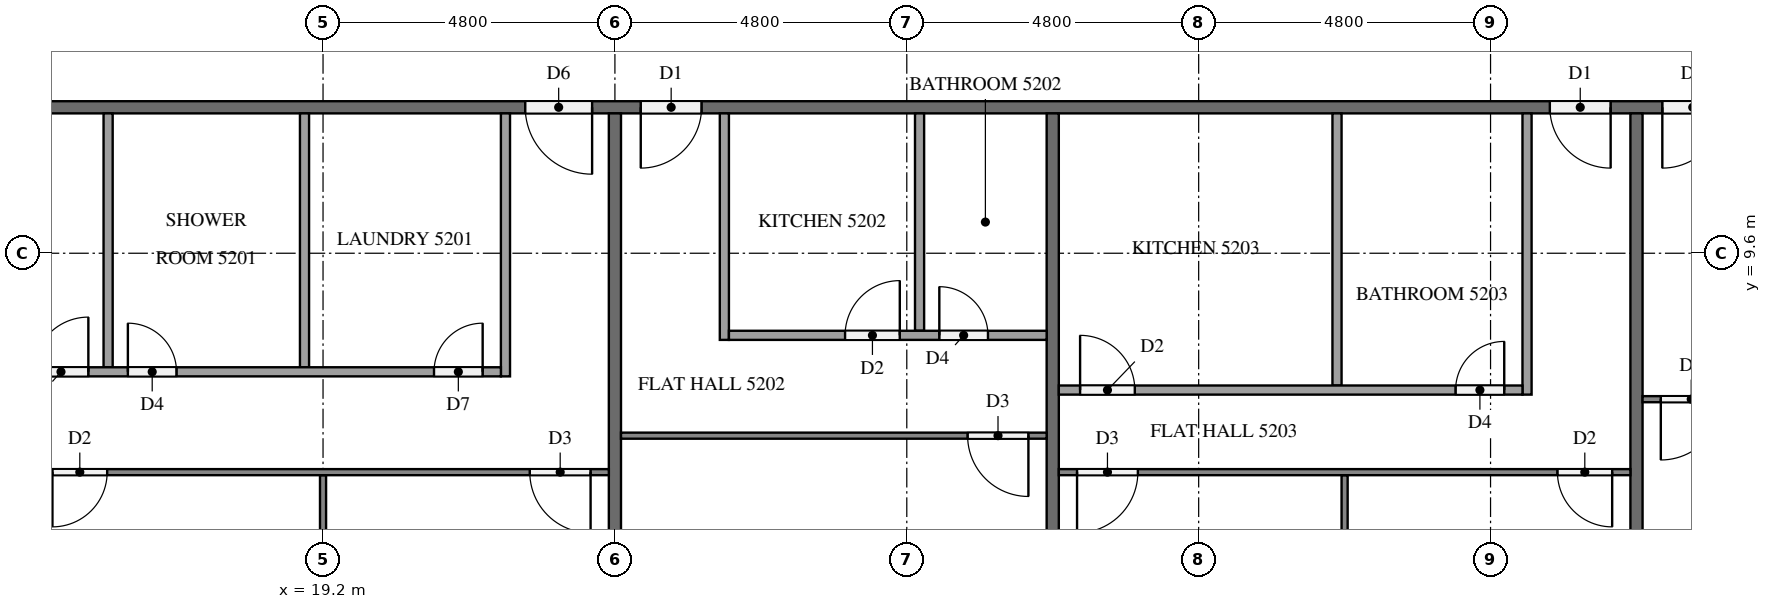
"""IFC4 building model, lengths in metres.
Left out: names, types, materials, properties, quantities, classifications, styles, units other than length and angle.
Written with IfcOpenShell. Run it as: python <this file> out.ifc"""

import sys

from ifc_helpers import new_model, si_unit, direction, frame, frame_2d, origin, place, context, subcontext, project, spatial, rectangle, extrude, element, fill, save


model = new_model("IFC4")
c1 = context("Model", 3, precision=1e-05, world=origin(), true_north=direction((0.0, 1.0)))
c2 = subcontext(c1, "Body", "Model", "MODEL_VIEW")
j1 = project(units=[si_unit("LENGTHUNIT", "METRE"), si_unit("PLANEANGLEUNIT", "RADIAN")], contexts=[c1])
p1 = place(None, origin())
s1 = spatial("IfcSite", under=j1, at=p1, CompositionType="ELEMENT")
p2 = place(p1, origin())
s2 = spatial("IfcBuilding", under=s1, at=p2, CompositionType="ELEMENT")
p3 = place(p2, frame((0.0, 0.0, 199.9)))
s3 = spatial("IfcBuildingStorey", under=s2, at=p3, CompositionType="ELEMENT", Elevation=199.9)
p4 = place(p3, frame((50.5, 12.0, 0.0), z_axis=(0.0, 0.0, 1.0), x_axis=(-1.0, 0.0, 0.0)))
e1 = element("IfcWall", 1, at=p4, inside=s3, PredefinedType="PARTITIONING", context=c2, shape_type="SweptSolid", body=[
    extrude(rectangle(XDim=38.6, YDim=0.2, at=frame_2d((19.3, 0.0))), origin(), (0.0, 0.0, 1.0), 3.1),
])
p5 = place(p4, frame((26.875, 0.0, 0.0)))
e2 = element("IfcOpeningElement", 2, at=p5, cuts=e1, PredefinedType="OPENING", context=c2, shape_type="SweptSolid", body=[
    extrude(rectangle(XDim=1.1, YDim=2.1, at=frame_2d((0.55, 1.05))), frame((0.0, 0.11, 0.0), z_axis=(0.0, -1.0, 0.0), x_axis=(1.0, 0.0, 0.0)), (0.0, 0.0, 1.0), 0.22),
])
p6 = place(p4, frame((25.075, 0.0, 0.0)))
e3 = element("IfcOpeningElement", 3, at=p6, cuts=e1, PredefinedType="OPENING", context=c2, shape_type="SweptSolid", body=[
    extrude(rectangle(XDim=1.0, YDim=2.1, at=frame_2d((0.5, 1.05))), frame((0.0, 0.11, 0.0), z_axis=(0.0, -1.0, 0.0), x_axis=(1.0, 0.0, 0.0)), (0.0, 0.0, 1.0), 0.22),
])
p7 = place(p4, frame((10.125, 0.0, 0.0)))
e4 = element("IfcOpeningElement", 4, at=p7, cuts=e1, PredefinedType="OPENING", context=c2, shape_type="SweptSolid", body=[
    extrude(rectangle(XDim=1.0, YDim=2.1, at=frame_2d((0.5, 1.05))), frame((0.0, 0.11, 0.0), z_axis=(0.0, -1.0, 0.0), x_axis=(1.0, 0.0, 0.0)), (0.0, 0.0, 1.0), 0.22),
])
p8 = place(p4, frame((8.275, 0.0, 0.0)))
e5 = element("IfcOpeningElement", 5, at=p8, cuts=e1, PredefinedType="OPENING", context=c2, shape_type="SweptSolid", body=[
    extrude(rectangle(XDim=1.0, YDim=2.1, at=frame_2d((0.5, 1.05))), frame((0.0, 0.11, 0.0), z_axis=(0.0, -1.0, 0.0), x_axis=(1.0, 0.0, 0.0)), (0.0, 0.0, 1.0), 0.22),
])
for number, where, z_axis, x_axis in (
    (6, (24.0, 11.9, 0.0), (0.0, 0.0, 1.0), (0.0, -1.0, 0.0)),
    (7, (31.2, 11.9, 0.0), (0.0, 0.0, 1.0), (0.0, -1.0, 0.0)),
    (8, (40.8, 11.9, 0.0), (0.0, 0.0, 1.0), (0.0, -1.0, 0.0)),
):
    element("IfcWall", number, at=place(p3, frame(where, z_axis=z_axis, x_axis=x_axis)), inside=s3, PredefinedType="PARTITIONING", context=c2, shape_type="SweptSolid", body=[
        extrude(rectangle(XDim=11.8, YDim=0.2, at=frame_2d((5.9, 0.0))), origin(), (0.0, 0.0, 1.0), 3.1),
    ])
p9 = place(p3, frame((19.2, 5.95, 0.0), z_axis=(0.0, 0.0, 1.0), x_axis=(0.0, -1.0, 0.0)))
e9 = element("IfcWall", 9, at=p9, inside=s3, PredefinedType="PARTITIONING", context=c2, shape_type="SweptSolid", body=[
    extrude(rectangle(XDim=5.625, YDim=0.1, at=frame_2d((2.812, 0.0))), origin(), (0.0, 0.0, 1.0), 3.1),
])
p10 = place(p3, frame((23.9, 6.0, 0.0), z_axis=(0.0, 0.0, 1.0), x_axis=(-1.0, 0.0, 0.0)))
e10 = element("IfcWall", 10, at=p10, inside=s3, PredefinedType="PARTITIONING", context=c2, shape_type="SweptSolid", body=[
    extrude(rectangle(XDim=19.0, YDim=0.1, at=frame_2d((9.5, 0.0))), origin(), (0.0, 0.0, 1.0), 3.1),
])
p11 = place(p10, frame((0.3, 0.0, 0.0)))
e11 = element("IfcOpeningElement", 11, at=p11, cuts=e10, PredefinedType="OPENING", context=c2, shape_type="SweptSolid", body=[
    extrude(rectangle(XDim=1.0, YDim=2.1, at=frame_2d((0.5, 1.05))), frame((0.0, 0.06, 0.0), z_axis=(0.0, -1.0, 0.0), x_axis=(1.0, 0.0, 0.0)), (0.0, 0.0, 1.0), 0.12),
])
p12 = place(p10, frame((8.25, 0.0, 0.0)))
e12 = element("IfcOpeningElement", 12, at=p12, cuts=e10, PredefinedType="OPENING", context=c2, shape_type="SweptSolid", body=[
    extrude(rectangle(XDim=0.9, YDim=2.1, at=frame_2d((0.45, 1.05))), frame((0.0, 0.06, 0.0), z_axis=(0.0, -1.0, 0.0), x_axis=(1.0, 0.0, 0.0)), (0.0, 0.0, 1.0), 0.12),
])
p13 = place(p10, frame((9.85, 0.0, 0.0)))
e13 = element("IfcOpeningElement", 13, at=p13, cuts=e10, PredefinedType="OPENING", context=c2, shape_type="SweptSolid", body=[
    extrude(rectangle(XDim=0.9, YDim=2.1, at=frame_2d((0.45, 1.05))), frame((0.0, 0.06, 0.0), z_axis=(0.0, -1.0, 0.0), x_axis=(1.0, 0.0, 0.0)), (0.0, 0.0, 1.0), 0.12),
])
p14 = place(p10, frame((17.7, 0.0, 0.0)))
e14 = element("IfcOpeningElement", 14, at=p14, cuts=e10, PredefinedType="OPENING", context=c2, shape_type="SweptSolid", body=[
    extrude(rectangle(XDim=0.9, YDim=2.1, at=frame_2d((0.45, 1.05))), frame((0.0, 0.06, 0.0), z_axis=(0.0, -1.0, 0.0), x_axis=(1.0, 0.0, 0.0)), (0.0, 0.0, 1.0), 0.12),
])
for number, where, z_axis, x_axis in (
    (15, (18.895, 11.9, 0.0), (0.0, 0.0, 1.0), (0.0, -1.0, 0.0)),
    (16, (15.666, 11.9, 0.0), (0.0, 0.0, 1.0), (0.0, -1.0, 0.0)),
):
    element("IfcWall", number, at=place(p3, frame(where, z_axis=z_axis, x_axis=x_axis)), inside=s3, PredefinedType="PARTITIONING", context=c2, shape_type="SweptSolid", body=[
        extrude(rectangle(XDim=4.175, YDim=0.15, at=frame_2d((2.087, 0.0))), origin(), (0.0, 0.0, 1.0), 3.1),
    ])
p15 = place(p3, frame((22.2, 11.9, 0.0), z_axis=(0.0, 0.0, 1.0), x_axis=(0.0, -1.0, 0.0)))
e17 = element("IfcWall", 17, at=p15, inside=s3, PredefinedType="PARTITIONING", context=c2, shape_type="SweptSolid", body=[
    extrude(rectangle(XDim=4.325, YDim=0.15, at=frame_2d((2.163, 0.0))), origin(), (0.0, 0.0, 1.0), 3.1),
])
p16 = place(p3, frame((4.9, 7.65, 0.0), z_axis=(0.0, 0.0, 1.0), x_axis=(1.0, 0.0, 0.0)))
e18 = element("IfcWall", 18, at=p16, inside=s3, PredefinedType="PARTITIONING", context=c2, shape_type="SweptSolid", body=[
    extrude(rectangle(XDim=17.225, YDim=0.15, at=frame_2d((8.613, 0.0))), origin(), (0.0, 0.0, 1.0), 3.1),
])
p17 = place(p16, frame((16.125, 0.0, 0.0)))
e19 = element("IfcOpeningElement", 19, at=p17, cuts=e18, PredefinedType="OPENING", context=c2, shape_type="SweptSolid", body=[
    extrude(rectangle(XDim=0.8, YDim=2.1, at=frame_2d((0.4, 1.05))), frame((0.0, 0.085, 0.0), z_axis=(0.0, -1.0, 0.0), x_axis=(1.0, 0.0, 0.0)), (0.0, 0.0, 1.0), 0.17),
])
p18 = place(p16, frame((11.091, 0.0, 0.0)))
e20 = element("IfcOpeningElement", 20, at=p18, cuts=e18, PredefinedType="OPENING", context=c2, shape_type="SweptSolid", body=[
    extrude(rectangle(XDim=0.8, YDim=2.1, at=frame_2d((0.4, 1.05))), frame((0.0, 0.085, 0.0), z_axis=(0.0, -1.0, 0.0), x_axis=(1.0, 0.0, 0.0)), (0.0, 0.0, 1.0), 0.17),
])
p19 = place(p16, frame((9.541, 0.0, 0.0)))
e21 = element("IfcOpeningElement", 21, at=p19, cuts=e18, PredefinedType="OPENING", context=c2, shape_type="SweptSolid", body=[
    extrude(rectangle(XDim=0.9, YDim=2.1, at=frame_2d((0.45, 1.05))), frame((0.0, 0.085, 0.0), z_axis=(0.0, -1.0, 0.0), x_axis=(1.0, 0.0, 0.0)), (0.0, 0.0, 1.0), 0.17),
])
p20 = place(p16, frame((0.35, 0.0, 0.0)))
e22 = element("IfcOpeningElement", 22, at=p20, cuts=e18, PredefinedType="OPENING", context=c2, shape_type="SweptSolid", body=[
    extrude(rectangle(XDim=0.9, YDim=2.1, at=frame_2d((0.45, 1.05))), frame((0.0, 0.085, 0.0), z_axis=(0.0, -1.0, 0.0), x_axis=(1.0, 0.0, 0.0)), (0.0, 0.0, 1.0), 0.17),
])
p21 = place(p3, frame((31.1, 6.6, 0.0), z_axis=(0.0, 0.0, 1.0), x_axis=(-1.0, 0.0, 0.0)))
e23 = element("IfcWall", 23, at=p21, inside=s3, PredefinedType="PARTITIONING", context=c2, shape_type="SweptSolid", body=[
    extrude(rectangle(XDim=7.0, YDim=0.1, at=frame_2d((3.5, 0.0))), origin(), (0.0, 0.0, 1.0), 3.1),
])
p22 = place(p21, frame((0.3, 0.0, 0.0)))
e24 = element("IfcOpeningElement", 24, at=p22, cuts=e23, PredefinedType="OPENING", context=c2, shape_type="SweptSolid", body=[
    extrude(rectangle(XDim=1.0, YDim=2.1, at=frame_2d((0.5, 1.05))), frame((0.0, 0.06, 0.0), z_axis=(0.0, -1.0, 0.0), x_axis=(1.0, 0.0, 0.0)), (0.0, 0.0, 1.0), 0.12),
])
p23 = place(p3, frame((29.01, 11.9, 0.0), z_axis=(0.0, 0.0, 1.0), x_axis=(0.0, -1.0, 0.0)))
e25 = element("IfcWall", 25, at=p23, inside=s3, PredefinedType="PARTITIONING", context=c2, shape_type="SweptSolid", body=[
    extrude(rectangle(XDim=3.575, YDim=0.15, at=frame_2d((1.788, 0.0))), origin(), (0.0, 0.0, 1.0), 3.1),
])
p24 = place(p3, frame((25.8, 11.9, 0.0), z_axis=(0.0, 0.0, 1.0), x_axis=(0.0, -1.0, 0.0)))
e26 = element("IfcWall", 26, at=p24, inside=s3, PredefinedType="PARTITIONING", context=c2, shape_type="SweptSolid", body=[
    extrude(rectangle(XDim=3.725, YDim=0.15, at=frame_2d((1.862, 0.0))), origin(), (0.0, 0.0, 1.0), 3.1),
])
p25 = place(p3, frame((25.875, 8.25, 0.0), z_axis=(0.0, 0.0, 1.0), x_axis=(1.0, 0.0, 0.0)))
e27 = element("IfcWall", 27, at=p25, inside=s3, PredefinedType="PARTITIONING", context=c2, shape_type="SweptSolid", body=[
    extrude(rectangle(XDim=5.225, YDim=0.15, at=frame_2d((2.613, 0.0))), origin(), (0.0, 0.0, 1.0), 3.1),
])
p26 = place(p25, frame((1.91, 0.0, 0.0)))
e28 = element("IfcOpeningElement", 28, at=p26, cuts=e27, PredefinedType="OPENING", context=c2, shape_type="SweptSolid", body=[
    extrude(rectangle(XDim=0.9, YDim=2.1, at=frame_2d((0.45, 1.05))), frame((0.0, 0.085, 0.0), z_axis=(0.0, -1.0, 0.0), x_axis=(1.0, 0.0, 0.0)), (0.0, 0.0, 1.0), 0.17),
])
p27 = place(p25, frame((3.46, 0.0, 0.0)))
e29 = element("IfcOpeningElement", 29, at=p27, cuts=e27, PredefinedType="OPENING", context=c2, shape_type="SweptSolid", body=[
    extrude(rectangle(XDim=0.8, YDim=2.1, at=frame_2d((0.4, 1.05))), frame((0.0, 0.085, 0.0), z_axis=(0.0, -1.0, 0.0), x_axis=(1.0, 0.0, 0.0)), (0.0, 0.0, 1.0), 0.17),
])
p28 = place(p3, frame((36.0, 5.95, 0.0), z_axis=(0.0, 0.0, 1.0), x_axis=(0.0, -1.0, 0.0)))
e30 = element("IfcWall", 30, at=p28, inside=s3, PredefinedType="PARTITIONING", context=c2, shape_type="SweptSolid", body=[
    extrude(rectangle(XDim=5.85, YDim=0.1, at=frame_2d((2.925, 0.0))), origin(), (0.0, 0.0, 1.0), 3.1),
])
p29 = place(p3, frame((40.7, 6.0, 0.0), z_axis=(0.0, 0.0, 1.0), x_axis=(-1.0, 0.0, 0.0)))
e31 = element("IfcWall", 31, at=p29, inside=s3, PredefinedType="PARTITIONING", context=c2, shape_type="SweptSolid", body=[
    extrude(rectangle(XDim=9.4, YDim=0.1, at=frame_2d((4.7, 0.0))), origin(), (0.0, 0.0, 1.0), 3.1),
])
p30 = place(p29, frame((0.3, 0.0, 0.0)))
e32 = element("IfcOpeningElement", 32, at=p30, cuts=e31, PredefinedType="OPENING", context=c2, shape_type="SweptSolid", body=[
    extrude(rectangle(XDim=0.9, YDim=2.1, at=frame_2d((0.45, 1.05))), frame((0.0, 0.06, 0.0), z_axis=(0.0, -1.0, 0.0), x_axis=(1.0, 0.0, 0.0)), (0.0, 0.0, 1.0), 0.12),
])
p31 = place(p29, frame((8.1, 0.0, 0.0)))
e33 = element("IfcOpeningElement", 33, at=p31, cuts=e31, PredefinedType="OPENING", context=c2, shape_type="SweptSolid", body=[
    extrude(rectangle(XDim=1.0, YDim=2.1, at=frame_2d((0.5, 1.05))), frame((0.0, 0.06, 0.0), z_axis=(0.0, -1.0, 0.0), x_axis=(1.0, 0.0, 0.0)), (0.0, 0.0, 1.0), 0.12),
])
p32 = place(p3, frame((35.875, 11.9, 0.0), z_axis=(0.0, 0.0, 1.0), x_axis=(0.0, -1.0, 0.0)))
e34 = element("IfcWall", 34, at=p32, inside=s3, PredefinedType="PARTITIONING", context=c2, shape_type="SweptSolid", body=[
    extrude(rectangle(XDim=4.475, YDim=0.15, at=frame_2d((2.237, 0.0))), origin(), (0.0, 0.0, 1.0), 3.1),
])
p33 = place(p3, frame((39.0, 11.9, 0.0), z_axis=(0.0, 0.0, 1.0), x_axis=(0.0, -1.0, 0.0)))
e35 = element("IfcWall", 35, at=p33, inside=s3, PredefinedType="PARTITIONING", context=c2, shape_type="SweptSolid", body=[
    extrude(rectangle(XDim=4.625, YDim=0.15, at=frame_2d((2.312, 0.0))), origin(), (0.0, 0.0, 1.0), 3.1),
])
p34 = place(p3, frame((31.3, 7.35, 0.0), z_axis=(0.0, 0.0, 1.0), x_axis=(1.0, 0.0, 0.0)))
e36 = element("IfcWall", 36, at=p34, inside=s3, PredefinedType="PARTITIONING", context=c2, shape_type="SweptSolid", body=[
    extrude(rectangle(XDim=7.625, YDim=0.15, at=frame_2d((3.812, 0.0))), origin(), (0.0, 0.0, 1.0), 3.1),
])
p35 = place(p34, frame((6.525, 0.0, 0.0)))
e37 = element("IfcOpeningElement", 37, at=p35, cuts=e36, PredefinedType="OPENING", context=c2, shape_type="SweptSolid", body=[
    extrude(rectangle(XDim=0.8, YDim=2.1, at=frame_2d((0.4, 1.05))), frame((0.0, 0.085, 0.0), z_axis=(0.0, -1.0, 0.0), x_axis=(1.0, 0.0, 0.0)), (0.0, 0.0, 1.0), 0.17),
])
p36 = place(p34, frame((0.35, 0.0, 0.0)))
e38 = element("IfcOpeningElement", 38, at=p36, cuts=e36, PredefinedType="OPENING", context=c2, shape_type="SweptSolid", body=[
    extrude(rectangle(XDim=0.9, YDim=2.1, at=frame_2d((0.45, 1.05))), frame((0.0, 0.085, 0.0), z_axis=(0.0, -1.0, 0.0), x_axis=(1.0, 0.0, 0.0)), (0.0, 0.0, 1.0), 0.17),
])
p37 = place(p3, frame((50.3, 7.2, 0.0), z_axis=(0.0, 0.0, 1.0), x_axis=(-1.0, 0.0, 0.0)))
e39 = element("IfcWall", 39, at=p37, inside=s3, PredefinedType="PARTITIONING", context=c2, shape_type="SweptSolid", body=[
    extrude(rectangle(XDim=9.4, YDim=0.1, at=frame_2d((4.7, 0.0))), origin(), (0.0, 0.0, 1.0), 3.1),
])
p38 = place(p37, frame((8.1, 0.0, 0.0)))
e40 = element("IfcOpeningElement", 40, at=p38, cuts=e39, PredefinedType="OPENING", context=c2, shape_type="SweptSolid", body=[
    extrude(rectangle(XDim=1.0, YDim=2.1, at=frame_2d((0.5, 1.05))), frame((0.0, 0.06, 0.0), z_axis=(0.0, -1.0, 0.0), x_axis=(1.0, 0.0, 0.0)), (0.0, 0.0, 1.0), 0.12),
])
p39 = place(p37, frame((0.3, 0.0, 0.0)))
e41 = element("IfcOpeningElement", 41, at=p39, cuts=e39, PredefinedType="OPENING", context=c2, shape_type="SweptSolid", body=[
    extrude(rectangle(XDim=0.9, YDim=2.1, at=frame_2d((0.45, 1.05))), frame((0.0, 0.06, 0.0), z_axis=(0.0, -1.0, 0.0), x_axis=(1.0, 0.0, 0.0)), (0.0, 0.0, 1.0), 0.12),
])
p40 = place(p5, origin())
e42 = element("IfcDoor", 42, at=p40, inside=s3, OperationType="SINGLE_SWING_LEFT", PredefinedType="DOOR", context=c2, shape_type="SweptSolid", body=[
    extrude(rectangle(XDim=1.1, YDim=2.1, at=frame_2d((0.55, 1.05))), frame((0.0, 0.025, 0.0), z_axis=(0.0, -1.0, 0.0), x_axis=(1.0, 0.0, 0.0)), (0.0, 0.0, 1.0), 0.05),
])
fill(e2, e42)
p41 = place(p6, origin())
e43 = element("IfcDoor", 43, at=p41, inside=s3, OperationType="SINGLE_SWING_RIGHT", PredefinedType="DOOR", context=c2, shape_type="SweptSolid", body=[
    extrude(rectangle(XDim=1.0, YDim=2.1, at=frame_2d((0.5, 1.05))), frame((0.0, 0.025, 0.0), z_axis=(0.0, -1.0, 0.0), x_axis=(1.0, 0.0, 0.0)), (0.0, 0.0, 1.0), 0.05),
])
fill(e3, e43)
p42 = place(p7, origin())
e44 = element("IfcDoor", 44, at=p42, inside=s3, OperationType="SINGLE_SWING_LEFT", PredefinedType="DOOR", context=c2, shape_type="SweptSolid", body=[
    extrude(rectangle(XDim=1.0, YDim=2.1, at=frame_2d((0.5, 1.05))), frame((0.0, 0.025, 0.0), z_axis=(0.0, -1.0, 0.0), x_axis=(1.0, 0.0, 0.0)), (0.0, 0.0, 1.0), 0.05),
])
fill(e4, e44)
p43 = place(p8, origin())
e45 = element("IfcDoor", 45, at=p43, inside=s3, OperationType="SINGLE_SWING_RIGHT", PredefinedType="DOOR", context=c2, shape_type="SweptSolid", body=[
    extrude(rectangle(XDim=1.0, YDim=2.1, at=frame_2d((0.5, 1.05))), frame((0.0, 0.025, 0.0), z_axis=(0.0, -1.0, 0.0), x_axis=(1.0, 0.0, 0.0)), (0.0, 0.0, 1.0), 0.05),
])
fill(e5, e45)
p44 = place(p11, origin())
e46 = element("IfcDoor", 46, at=p44, inside=s3, OperationType="SINGLE_SWING_LEFT", PredefinedType="DOOR", context=c2, shape_type="SweptSolid", body=[
    extrude(rectangle(XDim=1.0, YDim=2.1, at=frame_2d((0.5, 1.05))), frame((0.0, 0.025, 0.0), z_axis=(0.0, -1.0, 0.0), x_axis=(1.0, 0.0, 0.0)), (0.0, 0.0, 1.0), 0.05),
])
fill(e11, e46)
p45 = place(p12, origin())
e47 = element("IfcDoor", 47, at=p45, inside=s3, OperationType="SINGLE_SWING_RIGHT", PredefinedType="DOOR", context=c2, shape_type="SweptSolid", body=[
    extrude(rectangle(XDim=0.9, YDim=2.1, at=frame_2d((0.45, 1.05))), frame((0.0, 0.025, 0.0), z_axis=(0.0, -1.0, 0.0), x_axis=(1.0, 0.0, 0.0)), (0.0, 0.0, 1.0), 0.05),
])
fill(e12, e47)
p46 = place(p17, origin())
e48 = element("IfcDoor", 48, at=p46, inside=s3, OperationType="SINGLE_SWING_RIGHT", PredefinedType="DOOR", context=c2, shape_type="SweptSolid", body=[
    extrude(rectangle(XDim=0.8, YDim=2.1, at=frame_2d((0.4, 1.05))), frame((0.0, 0.025, 0.0), z_axis=(0.0, -1.0, 0.0), x_axis=(1.0, 0.0, 0.0)), (0.0, 0.0, 1.0), 0.05),
])
fill(e19, e48)
p47 = place(p18, origin())
e49 = element("IfcDoor", 49, at=p47, inside=s3, OperationType="SINGLE_SWING_LEFT", PredefinedType="DOOR", context=c2, shape_type="SweptSolid", body=[
    extrude(rectangle(XDim=0.8, YDim=2.1, at=frame_2d((0.4, 1.05))), frame((0.0, 0.025, 0.0), z_axis=(0.0, -1.0, 0.0), x_axis=(1.0, 0.0, 0.0)), (0.0, 0.0, 1.0), 0.05),
])
fill(e20, e49)
p48 = place(p19, origin())
e50 = element("IfcDoor", 50, at=p48, inside=s3, OperationType="SINGLE_SWING_RIGHT", PredefinedType="DOOR", context=c2, shape_type="SweptSolid", body=[
    extrude(rectangle(XDim=0.9, YDim=2.1, at=frame_2d((0.45, 1.05))), frame((0.0, 0.025, 0.0), z_axis=(0.0, -1.0, 0.0), x_axis=(1.0, 0.0, 0.0)), (0.0, 0.0, 1.0), 0.05),
])
fill(e21, e50)
p49 = place(p22, origin())
e51 = element("IfcDoor", 51, at=p49, inside=s3, OperationType="SINGLE_SWING_LEFT", PredefinedType="DOOR", context=c2, shape_type="SweptSolid", body=[
    extrude(rectangle(XDim=1.0, YDim=2.1, at=frame_2d((0.5, 1.05))), frame((0.0, 0.025, 0.0), z_axis=(0.0, -1.0, 0.0), x_axis=(1.0, 0.0, 0.0)), (0.0, 0.0, 1.0), 0.05),
])
fill(e24, e51)
p50 = place(p26, origin())
e52 = element("IfcDoor", 52, at=p50, inside=s3, OperationType="SINGLE_SWING_RIGHT", PredefinedType="DOOR", context=c2, shape_type="SweptSolid", body=[
    extrude(rectangle(XDim=0.9, YDim=2.1, at=frame_2d((0.45, 1.05))), frame((0.0, 0.025, 0.0), z_axis=(0.0, -1.0, 0.0), x_axis=(1.0, 0.0, 0.0)), (0.0, 0.0, 1.0), 0.05),
])
fill(e28, e52)
p51 = place(p27, origin())
e53 = element("IfcDoor", 53, at=p51, inside=s3, OperationType="SINGLE_SWING_LEFT", PredefinedType="DOOR", context=c2, shape_type="SweptSolid", body=[
    extrude(rectangle(XDim=0.8, YDim=2.1, at=frame_2d((0.4, 1.05))), frame((0.0, 0.025, 0.0), z_axis=(0.0, -1.0, 0.0), x_axis=(1.0, 0.0, 0.0)), (0.0, 0.0, 1.0), 0.05),
])
fill(e29, e53)
p52 = place(p30, origin())
e54 = element("IfcDoor", 54, at=p52, inside=s3, OperationType="SINGLE_SWING_LEFT", PredefinedType="DOOR", context=c2, shape_type="SweptSolid", body=[
    extrude(rectangle(XDim=0.9, YDim=2.1, at=frame_2d((0.45, 1.05))), frame((0.0, 0.025, 0.0), z_axis=(0.0, -1.0, 0.0), x_axis=(1.0, 0.0, 0.0)), (0.0, 0.0, 1.0), 0.05),
])
fill(e32, e54)
p53 = place(p31, origin())
e55 = element("IfcDoor", 55, at=p53, inside=s3, OperationType="SINGLE_SWING_RIGHT", PredefinedType="DOOR", context=c2, shape_type="SweptSolid", body=[
    extrude(rectangle(XDim=1.0, YDim=2.1, at=frame_2d((0.5, 1.05))), frame((0.0, 0.025, 0.0), z_axis=(0.0, -1.0, 0.0), x_axis=(1.0, 0.0, 0.0)), (0.0, 0.0, 1.0), 0.05),
])
fill(e33, e55)
p54 = place(p35, origin())
e56 = element("IfcDoor", 56, at=p54, inside=s3, OperationType="SINGLE_SWING_RIGHT", PredefinedType="DOOR", context=c2, shape_type="SweptSolid", body=[
    extrude(rectangle(XDim=0.8, YDim=2.1, at=frame_2d((0.4, 1.05))), frame((0.0, 0.025, 0.0), z_axis=(0.0, -1.0, 0.0), x_axis=(1.0, 0.0, 0.0)), (0.0, 0.0, 1.0), 0.05),
])
fill(e37, e56)
p55 = place(p36, origin())
e57 = element("IfcDoor", 57, at=p55, inside=s3, OperationType="SINGLE_SWING_LEFT", PredefinedType="DOOR", context=c2, shape_type="SweptSolid", body=[
    extrude(rectangle(XDim=0.9, YDim=2.1, at=frame_2d((0.45, 1.05))), frame((0.0, 0.025, 0.0), z_axis=(0.0, -1.0, 0.0), x_axis=(1.0, 0.0, 0.0)), (0.0, 0.0, 1.0), 0.05),
])
fill(e38, e57)
p56 = place(p38, origin())
e58 = element("IfcDoor", 58, at=p56, inside=s3, OperationType="SINGLE_SWING_RIGHT", PredefinedType="DOOR", context=c2, shape_type="SweptSolid", body=[
    extrude(rectangle(XDim=1.0, YDim=2.1, at=frame_2d((0.5, 1.05))), frame((0.0, 0.025, 0.0), z_axis=(0.0, -1.0, 0.0), x_axis=(1.0, 0.0, 0.0)), (0.0, 0.0, 1.0), 0.05),
])
fill(e40, e58)
save(model, sys.argv[1])
